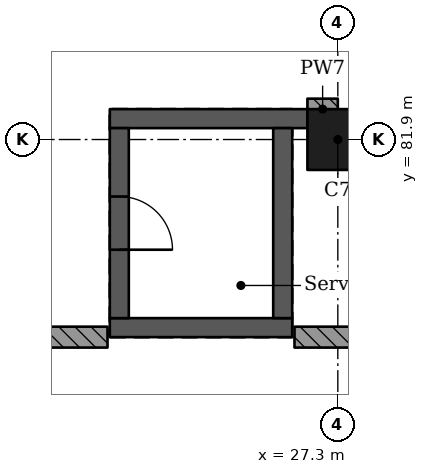
"""IFC4 building model, lengths in metres.
Left out: names, types, materials, properties, quantities, classifications, styles, units other than length and angle.
Written with IfcOpenShell. Run it as: python <this file> out.ifc"""

import sys

from ifc_helpers import new_model, si_unit, direction, frame, frame_2d, origin, origin_2d, place, context, subcontext, project, spatial, rectangle, extrude, element, fill, save


model = new_model("IFC4")
c1 = context("Model", 3, precision=1e-05, world=origin(), true_north=direction((0.0, 1.0)))
c2 = subcontext(c1, "Body", "Model", "MODEL_VIEW")
j1 = project(units=[si_unit("LENGTHUNIT", "METRE"), si_unit("PLANEANGLEUNIT", "RADIAN")], contexts=[c1])
p1 = place(None, origin())
s1 = spatial("IfcSite", under=j1, at=p1, CompositionType="ELEMENT")
p2 = place(p1, origin())
s2 = spatial("IfcBuilding", under=s1, at=p2, CompositionType="ELEMENT")
p3 = place(p2, frame((0.0, 0.0, 6.37)))
s3 = spatial("IfcBuildingStorey", under=s2, at=p3, CompositionType="ELEMENT", Elevation=6.37)
p4 = place(p3, frame((27.3, 81.9, 0.0), z_axis=(0.0, 0.0, 1.0), x_axis=(1.0, 0.0, 0.0)))
e1 = element("IfcColumn", 1, at=p4, inside=s3, PredefinedType="COLUMN", context=c2, shape_type="SweptSolid", body=[
    extrude(rectangle(XDim=0.8, YDim=0.8, at=origin_2d()), origin(), (0.0, 0.0, 1.0), 4.55),
])
p5 = place(p3, frame((26.7, 79.425, 0.0), z_axis=(0.0, 0.0, 1.0), x_axis=(-1.0, 0.0, 0.0)))
e2 = element("IfcWall", 2, at=p5, inside=s3, PredefinedType="SHEAR", context=c2, shape_type="SweptSolid", body=[
    extrude(rectangle(XDim=2.4, YDim=0.25, at=frame_2d((1.2, 0.0))), origin(), (0.0, 0.0, 1.0), 4.55),
])
p6 = place(p3, frame((26.9, 82.175, 0.0), z_axis=(0.0, 0.0, 1.0), x_axis=(-1.0, 0.0, 0.0)))
e3 = element("IfcWall", 3, at=p6, inside=s3, PredefinedType="SHEAR", context=c2, shape_type="SweptSolid", body=[
    extrude(rectangle(XDim=2.6, YDim=0.25, at=frame_2d((1.3, 0.0))), origin(), (0.0, 0.0, 1.0), 4.55),
])
p7 = place(p3, frame((24.425, 82.05, 0.0), z_axis=(0.0, 0.0, 1.0), x_axis=(0.0, -1.0, 0.0)))
e4 = element("IfcWall", 4, at=p7, inside=s3, PredefinedType="SHEAR", context=c2, shape_type="SweptSolid", body=[
    extrude(rectangle(XDim=2.5, YDim=0.25, at=frame_2d((1.25, 0.0))), origin(), (0.0, 0.0, 1.0), 4.55),
])
p8 = place(p7, frame((0.9, 0.0, 0.0)))
e5 = element("IfcOpeningElement", 5, at=p8, cuts=e4, PredefinedType="OPENING", context=c2, shape_type="SweptSolid", body=[
    extrude(rectangle(XDim=0.7, YDim=2.1, at=frame_2d((0.35, 1.05))), frame((0.0, 0.135, 0.0), z_axis=(0.0, -1.0, 0.0), x_axis=(1.0, 0.0, 0.0)), (0.0, 0.0, 1.0), 0.27),
])
p9 = place(p3, frame((26.575, 82.05, 0.0), z_axis=(0.0, 0.0, 1.0), x_axis=(0.0, -1.0, 0.0)))
e6 = element("IfcWall", 6, at=p9, inside=s3, PredefinedType="SHEAR", context=c2, shape_type="SweptSolid", body=[
    extrude(rectangle(XDim=2.5, YDim=0.25, at=frame_2d((1.25, 0.0))), origin(), (0.0, 0.0, 1.0), 4.55),
])
p10 = place(p3, frame((24.27, 79.3, 0.0), z_axis=(0.0, 0.0, 1.0), x_axis=(-1.0, 0.0, 0.0)))
e7 = element("IfcWall", 7, at=p10, inside=s3, PredefinedType="SOLIDWALL", context=c2, shape_type="SweptSolid", body=[
    extrude(rectangle(XDim=5.508, YDim=0.275, at=frame_2d((2.754, 0.0))), origin(), (0.0, 0.0, 1.0), 4.25),
])
p11 = place(p3, frame((27.3, 82.3, 0.0), z_axis=(0.0, 0.0, 1.0), x_axis=(-1.0, 0.0, 0.0)))
e8 = element("IfcWall", 8, at=p11, inside=s3, PredefinedType="SOLIDWALL", context=c2, shape_type="SweptSolid", body=[
    extrude(rectangle(XDim=0.4, YDim=0.275, at=frame_2d((0.2, 0.0))), origin(), (0.0, 0.0, 1.0), 4.25),
])
p12 = place(p3, frame((26.73, 79.3, 0.0), z_axis=(0.0, 0.0, 1.0), x_axis=(1.0, 0.0, 0.0)))
e9 = element("IfcWall", 9, at=p12, inside=s3, PredefinedType="SOLIDWALL", context=c2, shape_type="SweptSolid", body=[
    extrude(rectangle(XDim=6.808, YDim=0.275, at=frame_2d((3.404, 0.0))), origin(), (0.0, 0.0, 1.0), 4.25),
])
p13 = place(p8, origin())
e10 = element("IfcDoor", 10, at=p13, inside=s3, OperationType="SINGLE_SWING_LEFT", PredefinedType="DOOR", context=c2, shape_type="SweptSolid", body=[
    extrude(rectangle(XDim=0.7, YDim=2.1, at=frame_2d((0.35, 1.05))), frame((0.0, 0.025, 0.0), z_axis=(0.0, -1.0, 0.0), x_axis=(1.0, 0.0, 0.0)), (0.0, 0.0, 1.0), 0.05),
])
fill(e5, e10)
save(model, sys.argv[1])
